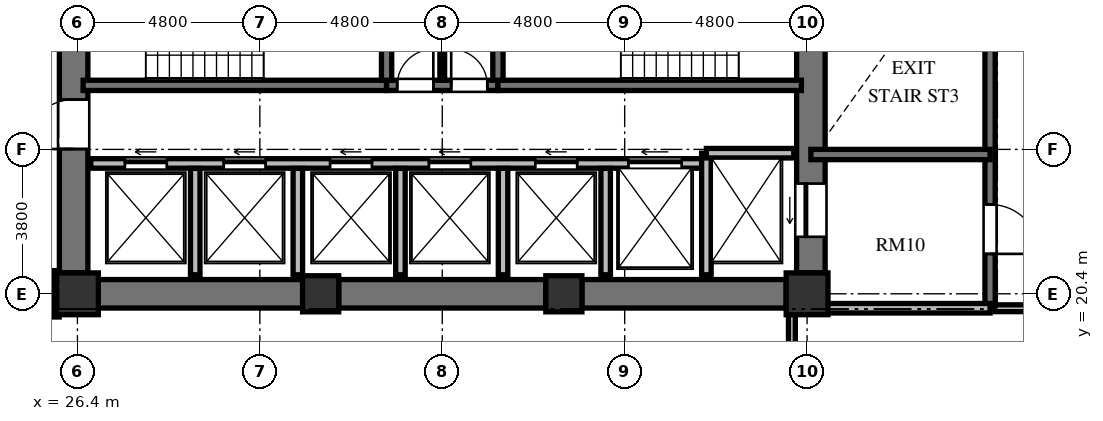
"""IFC4 building model, lengths in metres.
Left out: names, types, materials, properties, quantities, classifications, styles, units other than length and angle.
Written with IfcOpenShell. Run it as: python <this file> out.ifc"""

import sys

from ifc_helpers import new_model, si_unit, direction, frame, frame_2d, origin, origin_2d, place, context, subcontext, project, spatial, rectangle, extrude, element, fill, save


model = new_model("IFC4")
c1 = context("Model", 3, precision=1e-05, world=origin(), true_north=direction((0.0, 1.0)))
c2 = subcontext(c1, "Body", "Model", "MODEL_VIEW")
j1 = project(units=[si_unit("LENGTHUNIT", "METRE"), si_unit("PLANEANGLEUNIT", "RADIAN")], contexts=[c1])
p1 = place(None, origin())
s1 = spatial("IfcSite", under=j1, at=p1, CompositionType="ELEMENT")
p2 = place(p1, origin())
s2 = spatial("IfcBuilding", under=s1, at=p2, CompositionType="ELEMENT")
p3 = place(p2, frame((0.0, 0.0, 89.04)))
s3 = spatial("IfcBuildingStorey", under=s2, at=p3, CompositionType="ELEMENT", Elevation=89.04)
p4 = place(p3, frame((26.4, 20.4, 0.0), z_axis=(0.0, 0.0, 1.0), x_axis=(1.0, 0.0, 0.0)))
e1 = element("IfcColumn", 1, at=p4, inside=s3, PredefinedType="COLUMN", context=c2, shape_type="SweptSolid", body=[
    extrude(rectangle(XDim=1.1, YDim=1.1, at=origin_2d()), origin(), (0.0, 0.0, 1.0), 3.648),
])
for number, where, z_axis, x_axis in (
    (2, (32.8, 20.4, 0.0), (0.0, 0.0, 1.0), (1.0, 0.0, 0.0)),
    (3, (39.2, 20.4, 0.0), (0.0, 0.0, 1.0), (1.0, 0.0, 0.0)),
):
    element("IfcColumn", number, at=place(p3, frame(where, z_axis=z_axis, x_axis=x_axis)), inside=s3, PredefinedType="COLUMN", context=c2, shape_type="SweptSolid", body=[
        extrude(rectangle(XDim=0.95, YDim=0.95, at=origin_2d()), origin(), (0.0, 0.0, 1.0), 3.648),
    ])
p5 = place(p3, frame((45.6, 20.4, 0.0), z_axis=(0.0, 0.0, 1.0), x_axis=(1.0, 0.0, 0.0)))
e4 = element("IfcColumn", 4, at=p5, inside=s3, PredefinedType="COLUMN", context=c2, shape_type="SweptSolid", body=[
    extrude(rectangle(XDim=1.1, YDim=1.1, at=origin_2d()), origin(), (0.0, 0.0, 1.0), 3.648),
])
p6 = place(p3, frame((26.3, 20.95, 0.0), z_axis=(0.0, 0.0, 1.0), x_axis=(0.0, 1.0, 0.0)))
e5 = element("IfcWall", 5, at=p6, inside=s3, PredefinedType="SHEAR", context=c2, shape_type="SweptSolid", body=[
    extrude(rectangle(XDim=14.1, YDim=0.75, at=frame_2d((7.05, 0.0))), origin(), (0.0, 0.0, 1.0), 3.648),
])
p7 = place(p6, frame((6.5, 0.0, 0.0)))
e6 = element("IfcOpeningElement", 6, at=p7, cuts=e5, PredefinedType="OPENING", context=c2, shape_type="SweptSolid", body=[
    extrude(rectangle(XDim=1.2, YDim=2.15, at=frame_2d((0.6, 1.075))), frame((0.0, 0.385, 0.0), z_axis=(0.0, -1.0, 0.0), x_axis=(1.0, 0.0, 0.0)), (0.0, 0.0, 1.0), 0.77),
])
p8 = place(p6, frame((9.6, 0.0, 0.0)))
e7 = element("IfcOpeningElement", 7, at=p8, cuts=e5, PredefinedType="OPENING", context=c2, shape_type="SweptSolid", body=[
    extrude(rectangle(XDim=1.3, YDim=2.2, at=frame_2d((0.65, 1.1))), frame((0.0, 0.385, 0.0), z_axis=(0.0, -1.0, 0.0), x_axis=(1.0, 0.0, 0.0)), (0.0, 0.0, 1.0), 0.77),
])
p9 = place(p6, frame((3.26, 0.0, 0.0)))
e8 = element("IfcOpeningElement", 8, at=p9, cuts=e5, PredefinedType="OPENING", context=c2, shape_type="SweptSolid", body=[
    extrude(rectangle(XDim=1.3, YDim=2.2, at=frame_2d((0.65, 1.1))), frame((0.0, 0.385, 0.0), z_axis=(0.0, -1.0, 0.0), x_axis=(1.0, 0.0, 0.0)), (0.0, 0.0, 1.0), 0.77),
])
p10 = place(p3, frame((45.7, 20.95, 0.0), z_axis=(0.0, 0.0, 1.0), x_axis=(0.0, 1.0, 0.0)))
e9 = element("IfcWall", 9, at=p10, inside=s3, PredefinedType="SHEAR", context=c2, shape_type="SweptSolid", body=[
    extrude(rectangle(XDim=14.1, YDim=0.75, at=frame_2d((7.05, 0.0))), origin(), (0.0, 0.0, 1.0), 3.648),
])
p11 = place(p10, frame((11.75, 0.0, 0.0)))
e10 = element("IfcOpeningElement", 10, at=p11, cuts=e9, PredefinedType="OPENING", context=c2, shape_type="SweptSolid", body=[
    extrude(rectangle(XDim=1.4, YDim=2.3, at=frame_2d((0.7, 1.15))), frame((0.0, 0.385, 0.0), z_axis=(0.0, -1.0, 0.0), x_axis=(1.0, 0.0, 0.0)), (0.0, 0.0, 1.0), 0.77),
])
p12 = place(p10, frame((0.95, 0.0, 0.0)))
e11 = element("IfcOpeningElement", 11, at=p12, cuts=e9, PredefinedType="OPENING", context=c2, shape_type="SweptSolid", body=[
    extrude(rectangle(XDim=1.4, YDim=2.3, at=frame_2d((0.7, 1.15))), frame((0.0, 0.385, 0.0), z_axis=(0.0, -1.0, 0.0), x_axis=(1.0, 0.0, 0.0)), (0.0, 0.0, 1.0), 0.77),
])
p13 = place(p3, frame((26.95, 20.4, 0.0), z_axis=(0.0, 0.0, 1.0), x_axis=(1.0, 0.0, 0.0)))
e12 = element("IfcWall", 12, at=p13, inside=s3, PredefinedType="SHEAR", context=c2, shape_type="SweptSolid", body=[
    extrude(rectangle(XDim=5.375, YDim=0.75, at=frame_2d((2.688, 0.0))), origin(), (0.0, 0.0, 1.0), 3.648),
])
p14 = place(p3, frame((33.275, 20.4, 0.0), z_axis=(0.0, 0.0, 1.0), x_axis=(1.0, 0.0, 0.0)))
e13 = element("IfcWall", 13, at=p14, inside=s3, PredefinedType="SHEAR", context=c2, shape_type="SweptSolid", body=[
    extrude(rectangle(XDim=5.45, YDim=0.75, at=frame_2d((2.725, 0.0))), origin(), (0.0, 0.0, 1.0), 3.648),
])
p15 = place(p3, frame((39.675, 20.4, 0.0), z_axis=(0.0, 0.0, 1.0), x_axis=(1.0, 0.0, 0.0)))
e14 = element("IfcWall", 14, at=p15, inside=s3, PredefinedType="SHEAR", context=c2, shape_type="SweptSolid", body=[
    extrude(rectangle(XDim=5.375, YDim=0.75, at=frame_2d((2.688, 0.0))), origin(), (0.0, 0.0, 1.0), 3.648),
])
p16 = place(p3, frame((26.55, 25.885, 0.0), z_axis=(0.0, 0.0, 1.0), x_axis=(1.0, 0.0, 0.0)))
e15 = element("IfcWall", 15, at=p16, inside=s3, PredefinedType="SHEAR", context=c2, shape_type="SweptSolid", body=[
    extrude(rectangle(XDim=7.985, YDim=0.27, at=frame_2d((3.992, 0.0))), origin(), (0.0, 0.0, 1.0), 3.648),
])
p17 = place(p3, frame((34.535, 25.885, 0.0), z_axis=(0.0, 0.0, 1.0), x_axis=(1.0, 0.0, 0.0)))
e16 = element("IfcWall", 16, at=p17, inside=s3, PredefinedType="SHEAR", context=c2, shape_type="SweptSolid", body=[
    extrude(rectangle(XDim=2.93, YDim=0.27, at=frame_2d((1.465, 0.0))), origin(), (0.0, 0.0, 1.0), 3.648),
])
p18 = place(p17, frame((0.28, 0.0, 0.0)))
e17 = element("IfcOpeningElement", 17, at=p18, cuts=e16, PredefinedType="OPENING", context=c2, shape_type="SweptSolid", body=[
    extrude(rectangle(XDim=0.95, YDim=2.1, at=frame_2d((0.475, 1.05))), frame((0.0, 0.145, 0.0), z_axis=(0.0, -1.0, 0.0), x_axis=(1.0, 0.0, 0.0)), (0.0, 0.0, 1.0), 0.29),
])
p19 = place(p17, frame((1.7, 0.0, 0.0)))
e18 = element("IfcOpeningElement", 18, at=p19, cuts=e16, PredefinedType="OPENING", context=c2, shape_type="SweptSolid", body=[
    extrude(rectangle(XDim=0.95, YDim=2.1, at=frame_2d((0.475, 1.05))), frame((0.0, 0.145, 0.0), z_axis=(0.0, -1.0, 0.0), x_axis=(1.0, 0.0, 0.0)), (0.0, 0.0, 1.0), 0.29),
])
p20 = place(p3, frame((37.465, 25.885, 0.0), z_axis=(0.0, 0.0, 1.0), x_axis=(1.0, 0.0, 0.0)))
e19 = element("IfcWall", 19, at=p20, inside=s3, PredefinedType="SHEAR", context=c2, shape_type="SweptSolid", body=[
    extrude(rectangle(XDim=7.985, YDim=0.27, at=frame_2d((3.992, 0.0))), origin(), (0.0, 0.0, 1.0), 3.648),
])
for number, where, z_axis, x_axis in (
    (20, (34.535, 26.02, 0.0), (0.0, 0.0, 1.0), (0.0, 1.0, 0.0)),
    (21, (37.465, 26.02, 0.0), (0.0, 0.0, 1.0), (0.0, 1.0, 0.0)),
):
    element("IfcWall", number, at=place(p3, frame(where, z_axis=z_axis, x_axis=x_axis)), inside=s3, PredefinedType="SHEAR", context=c2, shape_type="SweptSolid", body=[
        extrude(rectangle(XDim=4.08, YDim=0.27, at=frame_2d((2.04, 0.0))), origin(), (0.0, 0.0, 1.0), 3.648),
    ])
p21 = place(p3, frame((36.0, 26.02, 0.0), z_axis=(0.0, 0.0, 1.0), x_axis=(0.0, 1.0, 0.0)))
e22 = element("IfcWall", 22, at=p21, inside=s3, PredefinedType="PARTITIONING", context=c2, shape_type="SweptSolid", body=[
    extrude(rectangle(XDim=4.08, YDim=0.125, at=frame_2d((2.04, 0.0))), origin(), (0.0, 0.0, 1.0), 3.428),
])
p22 = place(p3, frame((26.75, 23.83, 0.0), z_axis=(0.0, 0.0, 1.0), x_axis=(1.0, 0.0, 0.0)))
e23 = element("IfcWall", 23, at=p22, inside=s3, PredefinedType="SOLIDWALL", context=c2, shape_type="SweptSolid", body=[
    extrude(rectangle(XDim=16.2, YDim=0.25, at=frame_2d((8.1, 0.0))), origin(), (0.0, 0.0, 1.0), 3.428),
])
p23 = place(p22, frame((0.9, 0.0, 0.0)))
e24 = element("IfcOpeningElement", 24, at=p23, cuts=e23, PredefinedType="OPENING", context=c2, shape_type="SweptSolid", body=[
    extrude(rectangle(XDim=1.1, YDim=2.2, at=frame_2d((0.55, 1.1))), frame((0.0, 0.135, 0.0), z_axis=(0.0, -1.0, 0.0), x_axis=(1.0, 0.0, 0.0)), (0.0, 0.0, 1.0), 0.27),
])
p24 = place(p22, frame((3.5, 0.0, 0.0)))
e25 = element("IfcOpeningElement", 25, at=p24, cuts=e23, PredefinedType="OPENING", context=c2, shape_type="SweptSolid", body=[
    extrude(rectangle(XDim=1.1, YDim=2.2, at=frame_2d((0.55, 1.1))), frame((0.0, 0.135, 0.0), z_axis=(0.0, -1.0, 0.0), x_axis=(1.0, 0.0, 0.0)), (0.0, 0.0, 1.0), 0.27),
])
p25 = place(p22, frame((6.3, 0.0, 0.0)))
e26 = element("IfcOpeningElement", 26, at=p25, cuts=e23, PredefinedType="OPENING", context=c2, shape_type="SweptSolid", body=[
    extrude(rectangle(XDim=1.1, YDim=2.2, at=frame_2d((0.55, 1.1))), frame((0.0, 0.135, 0.0), z_axis=(0.0, -1.0, 0.0), x_axis=(1.0, 0.0, 0.0)), (0.0, 0.0, 1.0), 0.27),
])
p26 = place(p22, frame((8.9, 0.0, 0.0)))
e27 = element("IfcOpeningElement", 27, at=p26, cuts=e23, PredefinedType="OPENING", context=c2, shape_type="SweptSolid", body=[
    extrude(rectangle(XDim=1.1, YDim=2.2, at=frame_2d((0.55, 1.1))), frame((0.0, 0.135, 0.0), z_axis=(0.0, -1.0, 0.0), x_axis=(1.0, 0.0, 0.0)), (0.0, 0.0, 1.0), 0.27),
])
p27 = place(p22, frame((11.7, 0.0, 0.0)))
e28 = element("IfcOpeningElement", 28, at=p27, cuts=e23, PredefinedType="OPENING", context=c2, shape_type="SweptSolid", body=[
    extrude(rectangle(XDim=1.1, YDim=2.2, at=frame_2d((0.55, 1.1))), frame((0.0, 0.135, 0.0), z_axis=(0.0, -1.0, 0.0), x_axis=(1.0, 0.0, 0.0)), (0.0, 0.0, 1.0), 0.27),
])
p28 = place(p22, frame((14.15, 0.0, 0.0)))
e29 = element("IfcOpeningElement", 29, at=p28, cuts=e23, PredefinedType="OPENING", context=c2, shape_type="SweptSolid", body=[
    extrude(rectangle(XDim=1.4, YDim=2.3, at=frame_2d((0.7, 1.15))), frame((0.0, 0.135, 0.0), z_axis=(0.0, -1.0, 0.0), x_axis=(1.0, 0.0, 0.0)), (0.0, 0.0, 1.0), 0.27),
])
p29 = place(p3, frame((42.95, 20.9, 0.0), z_axis=(0.0, 0.0, 1.0), x_axis=(0.0, 1.0, 0.0)))
e30 = element("IfcWall", 30, at=p29, inside=s3, PredefinedType="SOLIDWALL", context=c2, shape_type="SweptSolid", body=[
    extrude(rectangle(XDim=3.2, YDim=0.25, at=frame_2d((1.6, 0.0))), origin(), (0.0, 0.0, 1.0), 3.428),
])
p30 = place(p3, frame((42.95, 24.1, 0.0), z_axis=(0.0, 0.0, 1.0), x_axis=(1.0, 0.0, 0.0)))
e31 = element("IfcWall", 31, at=p30, inside=s3, PredefinedType="SOLIDWALL", context=c2, shape_type="SweptSolid", body=[
    extrude(rectangle(XDim=2.3, YDim=0.25, at=frame_2d((1.15, 0.0))), origin(), (0.0, 0.0, 1.0), 3.428),
])
for number, where, z_axis, x_axis in (
    (32, (29.5, 20.9, 0.0), (0.0, 0.0, 1.0), (0.0, 1.0, 0.0)),
    (33, (32.2, 20.9, 0.0), (0.0, 0.0, 1.0), (0.0, 1.0, 0.0)),
    (34, (34.9, 20.9, 0.0), (0.0, 0.0, 1.0), (0.0, 1.0, 0.0)),
    (35, (37.6, 20.9, 0.0), (0.0, 0.0, 1.0), (0.0, 1.0, 0.0)),
    (36, (40.3, 20.9, 0.0), (0.0, 0.0, 1.0), (0.0, 1.0, 0.0)),
):
    element("IfcWall", number, at=place(p3, frame(where, z_axis=z_axis, x_axis=x_axis)), inside=s3, PredefinedType="SOLIDWALL", context=c2, shape_type="SweptSolid", body=[
        extrude(rectangle(XDim=2.8, YDim=0.25, at=frame_2d((1.4, 0.0))), origin(), (0.0, 0.0, 1.0), 3.428),
    ])
p31 = place(p3, frame((50.415, 35.845, 0.0), z_axis=(0.0, 0.0, 1.0), x_axis=(0.0, -1.0, 0.0)))
e37 = element("IfcWall", 37, at=p31, inside=s3, PredefinedType="SHEAR", context=c2, shape_type="SweptSolid", body=[
    extrude(rectangle(XDim=15.825, YDim=0.27, at=frame_2d((7.913, 0.0))), origin(), (0.0, 0.0, 1.0), 3.648),
])
p32 = place(p31, frame((4.445, 0.0, 0.0)))
e38 = element("IfcOpeningElement", 38, at=p32, cuts=e37, PredefinedType="OPENING", context=c2, shape_type="SweptSolid", body=[
    extrude(rectangle(XDim=1.2, YDim=2.15, at=frame_2d((0.6, 1.075))), frame((0.0, 0.145, 0.0), z_axis=(0.0, -1.0, 0.0), x_axis=(1.0, 0.0, 0.0)), (0.0, 0.0, 1.0), 0.29),
])
p33 = place(p31, frame((1.295, 0.0, 0.0)))
e39 = element("IfcOpeningElement", 39, at=p33, cuts=e37, PredefinedType="OPENING", context=c2, shape_type="SweptSolid", body=[
    extrude(rectangle(XDim=1.3, YDim=2.2, at=frame_2d((0.65, 1.1))), frame((0.0, 0.145, 0.0), z_axis=(0.0, -1.0, 0.0), x_axis=(1.0, 0.0, 0.0)), (0.0, 0.0, 1.0), 0.29),
])
p34 = place(p31, frame((13.095, 0.0, 0.0)))
e40 = element("IfcOpeningElement", 40, at=p34, cuts=e37, PredefinedType="OPENING", context=c2, shape_type="SweptSolid", body=[
    extrude(rectangle(XDim=1.3, YDim=2.2, at=frame_2d((0.65, 1.1))), frame((0.0, 0.145, 0.0), z_axis=(0.0, -1.0, 0.0), x_axis=(1.0, 0.0, 0.0)), (0.0, 0.0, 1.0), 0.29),
])
p35 = place(p3, frame((45.7, 24.065, 0.0), z_axis=(0.0, 0.0, 1.0), x_axis=(1.0, 0.0, 0.0)))
e41 = element("IfcWall", 41, at=p35, inside=s3, PredefinedType="SHEAR", context=c2, shape_type="SweptSolid", body=[
    extrude(rectangle(XDim=4.715, YDim=0.27, at=frame_2d((2.357, 0.0))), origin(), (0.0, 0.0, 1.0), 3.648),
])
p36 = place(p3, frame((45.7, 20.02, 0.0), z_axis=(0.0, 0.0, 1.0), x_axis=(1.0, 0.0, 0.0)))
e42 = element("IfcWall", 42, at=p36, inside=s3, PredefinedType="SOLIDWALL", context=c2, shape_type="SweptSolid", body=[
    extrude(rectangle(XDim=4.715, YDim=0.25, at=frame_2d((2.357, 0.0))), origin(), (0.0, 0.0, 1.0), 3.428),
])
p37 = place(p3, frame((53.19, 20.02, 0.0), z_axis=(0.0, 0.0, 1.0), x_axis=(-1.0, 0.0, 0.0)))
e43 = element("IfcWall", 43, at=p37, inside=s3, PredefinedType="PARTITIONING", context=c2, shape_type="SweptSolid", body=[
    extrude(rectangle(XDim=2.65, YDim=0.18, at=frame_2d((1.325, 0.0))), origin(), (0.0, 0.0, 1.0), 3.428),
])
p38 = place(p3, frame((25.83, 21.01, 0.0), z_axis=(0.0, 0.0, 1.0), x_axis=(0.0, -1.0, 0.0)))
e44 = element("IfcWall", 44, at=p38, inside=s3, PredefinedType="PARTITIONING", context=c2, shape_type="SweptSolid", body=[
    extrude(rectangle(XDim=1.22, YDim=0.18, at=frame_2d((0.61, 0.0))), origin(), (0.0, 0.0, 1.0), 3.428),
])
p39 = place(p3, frame((45.2, 19.91, 0.0), z_axis=(0.0, 0.0, 1.0), x_axis=(0.0, -1.0, 0.0)))
e45 = element("IfcWall", 45, at=p39, inside=s3, PredefinedType="PARTITIONING", context=c2, shape_type="SweptSolid", body=[
    extrude(rectangle(XDim=2.55, YDim=0.18, at=frame_2d((1.275, 0.0))), origin(), (0.0, 0.0, 1.0), 3.428),
])
p40 = place(p18, origin())
e46 = element("IfcDoor", 46, at=p40, inside=s3, OperationType="SINGLE_SWING_RIGHT", PredefinedType="DOOR", context=c2, shape_type="SweptSolid", body=[
    extrude(rectangle(XDim=0.95, YDim=2.1, at=frame_2d((0.475, 1.05))), frame((0.0, 0.025, 0.0), z_axis=(0.0, -1.0, 0.0), x_axis=(1.0, 0.0, 0.0)), (0.0, 0.0, 1.0), 0.05),
])
fill(e17, e46)
p41 = place(p19, origin())
e47 = element("IfcDoor", 47, at=p41, inside=s3, OperationType="SINGLE_SWING_LEFT", PredefinedType="DOOR", context=c2, shape_type="SweptSolid", body=[
    extrude(rectangle(XDim=0.95, YDim=2.1, at=frame_2d((0.475, 1.05))), frame((0.0, 0.025, 0.0), z_axis=(0.0, -1.0, 0.0), x_axis=(1.0, 0.0, 0.0)), (0.0, 0.0, 1.0), 0.05),
])
fill(e18, e47)
p42 = place(p9, origin())
e48 = element("IfcDoor", 48, at=p42, inside=s3, OperationType="SINGLE_SWING_LEFT", PredefinedType="DOOR", context=c2, shape_type="SweptSolid", body=[
    extrude(rectangle(XDim=1.3, YDim=2.2, at=frame_2d((0.65, 1.1))), frame((0.0, 0.025, 0.0), z_axis=(0.0, -1.0, 0.0), x_axis=(1.0, 0.0, 0.0)), (0.0, 0.0, 1.0), 0.05),
])
fill(e8, e48)
p43 = place(p23, origin())
e49 = element("IfcDoor", 49, at=p43, inside=s3, OperationType="SLIDING_TO_LEFT", PredefinedType="DOOR", context=c2, shape_type="SweptSolid", body=[
    extrude(rectangle(XDim=1.1, YDim=2.2, at=frame_2d((0.55, 1.1))), frame((0.0, 0.025, 0.0), z_axis=(0.0, -1.0, 0.0), x_axis=(1.0, 0.0, 0.0)), (0.0, 0.0, 1.0), 0.05),
])
fill(e24, e49)
p44 = place(p24, origin())
e50 = element("IfcDoor", 50, at=p44, inside=s3, OperationType="SLIDING_TO_LEFT", PredefinedType="DOOR", context=c2, shape_type="SweptSolid", body=[
    extrude(rectangle(XDim=1.1, YDim=2.2, at=frame_2d((0.55, 1.1))), frame((0.0, 0.025, 0.0), z_axis=(0.0, -1.0, 0.0), x_axis=(1.0, 0.0, 0.0)), (0.0, 0.0, 1.0), 0.05),
])
fill(e25, e50)
p45 = place(p25, origin())
e51 = element("IfcDoor", 51, at=p45, inside=s3, OperationType="SLIDING_TO_LEFT", PredefinedType="DOOR", context=c2, shape_type="SweptSolid", body=[
    extrude(rectangle(XDim=1.1, YDim=2.2, at=frame_2d((0.55, 1.1))), frame((0.0, 0.025, 0.0), z_axis=(0.0, -1.0, 0.0), x_axis=(1.0, 0.0, 0.0)), (0.0, 0.0, 1.0), 0.05),
])
fill(e26, e51)
p46 = place(p26, origin())
e52 = element("IfcDoor", 52, at=p46, inside=s3, OperationType="SLIDING_TO_LEFT", PredefinedType="DOOR", context=c2, shape_type="SweptSolid", body=[
    extrude(rectangle(XDim=1.1, YDim=2.2, at=frame_2d((0.55, 1.1))), frame((0.0, 0.025, 0.0), z_axis=(0.0, -1.0, 0.0), x_axis=(1.0, 0.0, 0.0)), (0.0, 0.0, 1.0), 0.05),
])
fill(e27, e52)
p47 = place(p27, origin())
e53 = element("IfcDoor", 53, at=p47, inside=s3, OperationType="SLIDING_TO_LEFT", PredefinedType="DOOR", context=c2, shape_type="SweptSolid", body=[
    extrude(rectangle(XDim=1.1, YDim=2.2, at=frame_2d((0.55, 1.1))), frame((0.0, 0.025, 0.0), z_axis=(0.0, -1.0, 0.0), x_axis=(1.0, 0.0, 0.0)), (0.0, 0.0, 1.0), 0.05),
])
fill(e28, e53)
p48 = place(p12, origin())
e54 = element("IfcDoor", 54, at=p48, inside=s3, OperationType="SLIDING_TO_LEFT", PredefinedType="DOOR", context=c2, shape_type="SweptSolid", body=[
    extrude(rectangle(XDim=1.4, YDim=2.3, at=frame_2d((0.7, 1.15))), frame((0.0, 0.025, 0.0), z_axis=(0.0, -1.0, 0.0), x_axis=(1.0, 0.0, 0.0)), (0.0, 0.0, 1.0), 0.05),
])
fill(e11, e54)
p49 = place(p28, origin())
e55 = element("IfcDoor", 55, at=p49, inside=s3, OperationType="SLIDING_TO_LEFT", PredefinedType="DOOR", context=c2, shape_type="SweptSolid", body=[
    extrude(rectangle(XDim=1.4, YDim=2.3, at=frame_2d((0.7, 1.15))), frame((0.0, 0.025, 0.0), z_axis=(0.0, -1.0, 0.0), x_axis=(1.0, 0.0, 0.0)), (0.0, 0.0, 1.0), 0.05),
])
fill(e29, e55)
p50 = place(p34, origin())
e56 = element("IfcDoor", 56, at=p50, inside=s3, OperationType="SINGLE_SWING_RIGHT", PredefinedType="DOOR", context=c2, shape_type="SweptSolid", body=[
    extrude(rectangle(XDim=1.3, YDim=2.2, at=frame_2d((0.65, 1.1))), frame((0.0, 0.025, 0.0), z_axis=(0.0, -1.0, 0.0), x_axis=(1.0, 0.0, 0.0)), (0.0, 0.0, 1.0), 0.05),
])
fill(e40, e56)
save(model, sys.argv[1])
